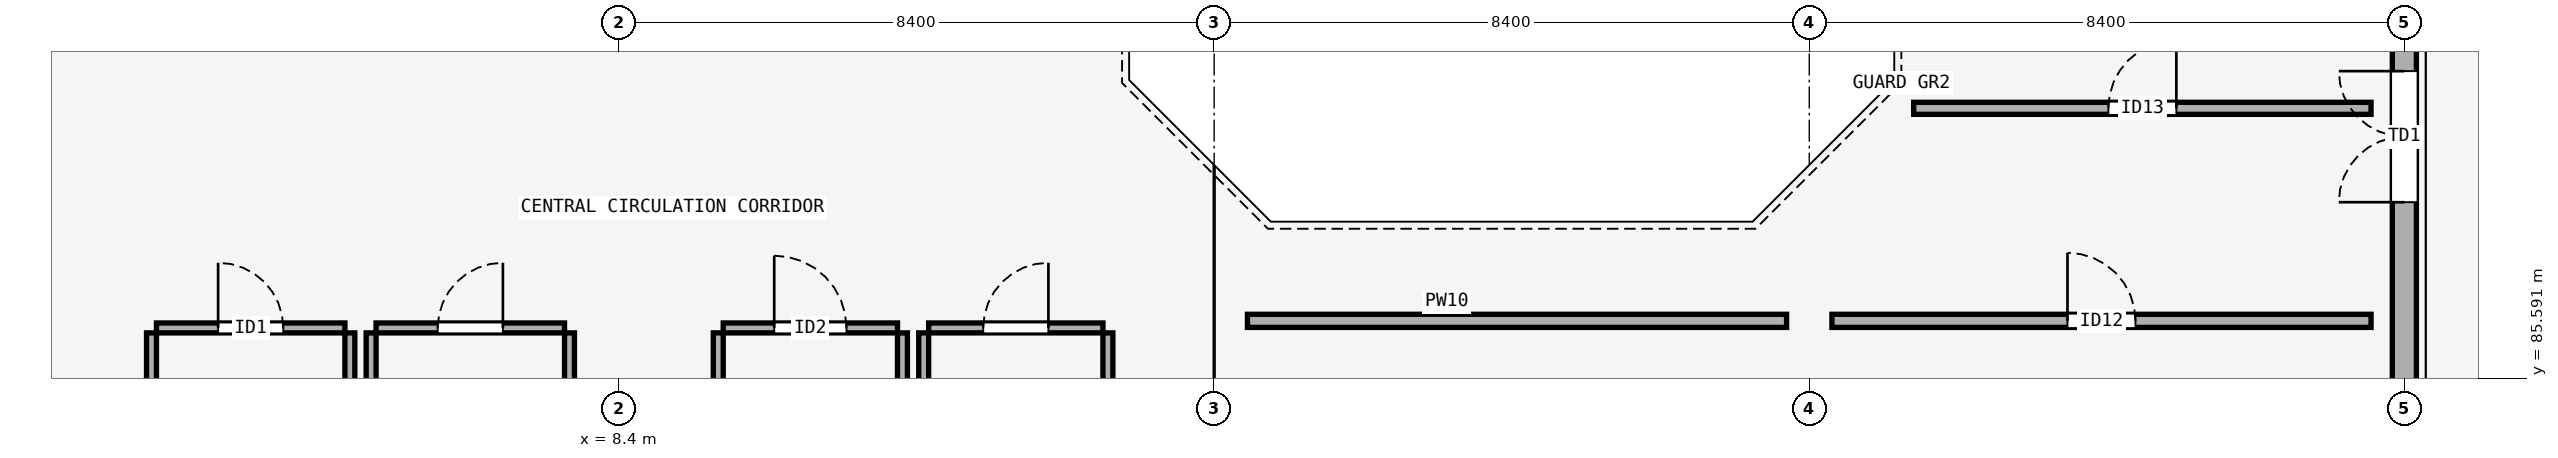
"""IFC4 building model, lengths in metres.
Left out: names, types, materials, properties, quantities, classifications, styles, units other than length and angle.
Written with IfcOpenShell. Run it as: python <this file> out.ifc"""

import sys

from ifc_helpers import new_model, si_unit, direction, frame, frame_2d, origin, place, context, subcontext, project, spatial, rectangle, extrude, element, fill, save


model = new_model("IFC4")
c1 = context("Model", 3, precision=1e-05, world=origin(), true_north=direction((0.0, 1.0)))
c2 = subcontext(c1, "Body", "Model", "MODEL_VIEW")
j1 = project(units=[si_unit("LENGTHUNIT", "METRE"), si_unit("PLANEANGLEUNIT", "RADIAN")], contexts=[c1])
p1 = place(None, origin())
s1 = spatial("IfcSite", under=j1, at=p1, CompositionType="ELEMENT")
p2 = place(p1, origin())
s2 = spatial("IfcBuilding", under=s1, at=p2, CompositionType="ELEMENT")
p3 = place(p2, frame((0.0, 0.0, 27.9)))
s3 = spatial("IfcBuildingStorey", under=s2, at=p3, CompositionType="ELEMENT", Elevation=27.9)
p4 = place(p3, frame((33.6, 85.125, 0.0), z_axis=(0.0, 0.0, 1.0), x_axis=(0.0, 1.0, 0.0)))
e1 = element("IfcWall", 1, at=p4, inside=s3, PredefinedType="SOLIDWALL", context=c2, shape_type="SweptSolid", body=[
    extrude(rectangle(XDim=7.75, YDim=0.34, at=frame_2d((3.875, 0.0))), origin(), (0.0, 0.0, 1.0), 3.45),
])
p5 = place(p4, frame((2.95, 0.0, 0.0)))
e2 = element("IfcOpeningElement", 2, at=p5, cuts=e1, PredefinedType="OPENING", context=c2, shape_type="SweptSolid", body=[
    extrude(rectangle(XDim=1.85, YDim=2.3, at=frame_2d((0.925, 1.15))), frame((0.0, 0.18, 0.0), z_axis=(0.0, -1.0, 0.0), x_axis=(1.0, 0.0, 0.0)), (0.0, 0.0, 1.0), 0.36),
])
p6 = place(p3, frame((1.87, 86.3, 0.0), z_axis=(0.0, 0.0, 1.0), x_axis=(1.0, 0.0, 0.0)))
e3 = element("IfcWall", 3, at=p6, inside=s3, PredefinedType="PARTITIONING", context=c2, shape_type="SweptSolid", body=[
    extrude(rectangle(XDim=2.66, YDim=0.14, at=frame_2d((1.33, 0.0))), origin(), (0.0, 0.0, 1.0), 4.2),
])
p7 = place(p6, frame((0.87, 0.0, 0.0)))
e4 = element("IfcOpeningElement", 4, at=p7, cuts=e3, PredefinedType="OPENING", context=c2, shape_type="SweptSolid", body=[
    extrude(rectangle(XDim=0.92, YDim=2.12, at=frame_2d((0.46, 1.06))), frame((0.0, 0.08, 0.0), z_axis=(0.0, -1.0, 0.0), x_axis=(1.0, 0.0, 0.0)), (0.0, 0.0, 1.0), 0.16),
])
for number, where, z_axis, x_axis in (
    (5, (1.8, 83.87, 0.0), (0.0, 0.0, 1.0), (0.0, 1.0, 0.0)),
    (6, (4.6, 83.87, 0.0), (0.0, 0.0, 1.0), (0.0, 1.0, 0.0)),
):
    element("IfcWall", number, at=place(p3, frame(where, z_axis=z_axis, x_axis=x_axis)), inside=s3, PredefinedType="PARTITIONING", context=c2, shape_type="SweptSolid", body=[
        extrude(rectangle(XDim=2.36, YDim=0.14, at=frame_2d((1.18, 0.0))), origin(), (0.0, 0.0, 1.0), 3.45),
    ])
p8 = place(p3, frame((4.97, 86.3, 0.0), z_axis=(0.0, 0.0, 1.0), x_axis=(1.0, 0.0, 0.0)))
e7 = element("IfcWall", 7, at=p8, inside=s3, PredefinedType="PARTITIONING", context=c2, shape_type="SweptSolid", body=[
    extrude(rectangle(XDim=2.66, YDim=0.14, at=frame_2d((1.33, 0.0))), origin(), (0.0, 0.0, 1.0), 4.2),
])
p9 = place(p8, frame((0.87, 0.0, 0.0)))
e8 = element("IfcOpeningElement", 8, at=p9, cuts=e7, PredefinedType="OPENING", context=c2, shape_type="SweptSolid", body=[
    extrude(rectangle(XDim=0.92, YDim=2.12, at=frame_2d((0.46, 1.06))), frame((0.0, 0.08, 0.0), z_axis=(0.0, -1.0, 0.0), x_axis=(1.0, 0.0, 0.0)), (0.0, 0.0, 1.0), 0.16),
])
for number, where, z_axis, x_axis in (
    (9, (4.9, 83.87, 0.0), (0.0, 0.0, 1.0), (0.0, 1.0, 0.0)),
    (10, (7.7, 83.87, 0.0), (0.0, 0.0, 1.0), (0.0, 1.0, 0.0)),
):
    element("IfcWall", number, at=place(p3, frame(where, z_axis=z_axis, x_axis=x_axis)), inside=s3, PredefinedType="PARTITIONING", context=c2, shape_type="SweptSolid", body=[
        extrude(rectangle(XDim=2.36, YDim=0.14, at=frame_2d((1.18, 0.0))), origin(), (0.0, 0.0, 1.0), 3.45),
    ])
p10 = place(p3, frame((9.87, 86.3, 0.0), z_axis=(0.0, 0.0, 1.0), x_axis=(1.0, 0.0, 0.0)))
e11 = element("IfcWall", 11, at=p10, inside=s3, PredefinedType="PARTITIONING", context=c2, shape_type="SweptSolid", body=[
    extrude(rectangle(XDim=2.46, YDim=0.14, at=frame_2d((1.23, 0.0))), origin(), (0.0, 0.0, 1.0), 4.2),
])
p11 = place(p10, frame((0.72, 0.0, 0.0)))
e12 = element("IfcOpeningElement", 12, at=p11, cuts=e11, PredefinedType="OPENING", context=c2, shape_type="SweptSolid", body=[
    extrude(rectangle(XDim=1.02, YDim=2.15, at=frame_2d((0.51, 1.075))), frame((0.0, 0.08, 0.0), z_axis=(0.0, -1.0, 0.0), x_axis=(1.0, 0.0, 0.0)), (0.0, 0.0, 1.0), 0.16),
])
for number, where, z_axis, x_axis in (
    (13, (9.8, 83.87, 0.0), (0.0, 0.0, 1.0), (0.0, 1.0, 0.0)),
    (14, (12.4, 83.87, 0.0), (0.0, 0.0, 1.0), (0.0, 1.0, 0.0)),
):
    element("IfcWall", number, at=place(p3, frame(where, z_axis=z_axis, x_axis=x_axis)), inside=s3, PredefinedType="PARTITIONING", context=c2, shape_type="SweptSolid", body=[
        extrude(rectangle(XDim=2.36, YDim=0.14, at=frame_2d((1.18, 0.0))), origin(), (0.0, 0.0, 1.0), 3.45),
    ])
p12 = place(p3, frame((12.77, 86.3, 0.0), z_axis=(0.0, 0.0, 1.0), x_axis=(1.0, 0.0, 0.0)))
e15 = element("IfcWall", 15, at=p12, inside=s3, PredefinedType="PARTITIONING", context=c2, shape_type="SweptSolid", body=[
    extrude(rectangle(XDim=2.46, YDim=0.14, at=frame_2d((1.23, 0.0))), origin(), (0.0, 0.0, 1.0), 4.2),
])
p13 = place(p12, frame((0.77, 0.0, 0.0)))
e16 = element("IfcOpeningElement", 16, at=p13, cuts=e15, PredefinedType="OPENING", context=c2, shape_type="SweptSolid", body=[
    extrude(rectangle(XDim=0.92, YDim=2.12, at=frame_2d((0.46, 1.06))), frame((0.0, 0.08, 0.0), z_axis=(0.0, -1.0, 0.0), x_axis=(1.0, 0.0, 0.0)), (0.0, 0.0, 1.0), 0.16),
])
for number, where, z_axis, x_axis in (
    (17, (12.7, 83.87, 0.0), (0.0, 0.0, 1.0), (0.0, 1.0, 0.0)),
    (18, (15.3, 83.87, 0.0), (0.0, 0.0, 1.0), (0.0, 1.0, 0.0)),
):
    element("IfcWall", number, at=place(p3, frame(where, z_axis=z_axis, x_axis=x_axis)), inside=s3, PredefinedType="PARTITIONING", context=c2, shape_type="SweptSolid", body=[
        extrude(rectangle(XDim=2.36, YDim=0.14, at=frame_2d((1.18, 0.0))), origin(), (0.0, 0.0, 1.0), 3.45),
    ])
p14 = place(p3, frame((17.27, 86.4, 0.0), z_axis=(0.0, 0.0, 1.0), x_axis=(1.0, 0.0, 0.0)))
e19 = element("IfcWall", 19, at=p14, inside=s3, PredefinedType="PARTITIONING", context=c2, shape_type="SweptSolid", body=[
    extrude(rectangle(XDim=7.61, YDim=0.185, at=frame_2d((3.805, 0.0))), origin(), (0.0, 0.0, 1.0), 4.2),
])
p15 = place(p3, frame((25.52, 86.4, 0.0), z_axis=(0.0, 0.0, 1.0), x_axis=(1.0, 0.0, 0.0)))
e20 = element("IfcWall", 20, at=p15, inside=s3, PredefinedType="PARTITIONING", context=c2, shape_type="SweptSolid", body=[
    extrude(rectangle(XDim=7.61, YDim=0.185, at=frame_2d((3.805, 0.0))), origin(), (0.0, 0.0, 1.0), 4.2),
])
p16 = place(p15, frame((3.325, 0.0, 0.0)))
e21 = element("IfcOpeningElement", 21, at=p16, cuts=e20, PredefinedType="OPENING", context=c2, shape_type="SweptSolid", body=[
    extrude(rectangle(XDim=0.96, YDim=2.22, at=frame_2d((0.48, 1.11))), frame((0.0, 0.103, 0.0), z_axis=(0.0, -1.0, 0.0), x_axis=(1.0, 0.0, 0.0)), (0.0, 0.0, 1.0), 0.205),
])
p17 = place(p3, frame((26.674, 89.4, 0.0), z_axis=(0.0, 0.0, 1.0), x_axis=(1.0, 0.0, 0.0)))
e22 = element("IfcWall", 22, at=p17, inside=s3, PredefinedType="PARTITIONING", context=c2, shape_type="SweptSolid", body=[
    extrude(rectangle(XDim=6.456, YDim=0.17, at=frame_2d((3.228, 0.0))), origin(), (0.0, 0.0, 1.0), 4.2),
])
p18 = place(p17, frame((2.748, 0.0, 0.0)))
e23 = element("IfcOpeningElement", 23, at=p18, cuts=e22, PredefinedType="OPENING", context=c2, shape_type="SweptSolid", body=[
    extrude(rectangle(XDim=0.96, YDim=2.34, at=frame_2d((0.48, 1.17))), frame((0.0, 0.095, 0.0), z_axis=(0.0, -1.0, 0.0), x_axis=(1.0, 0.0, 0.0)), (0.0, 0.0, 1.0), 0.19),
])
p19 = place(p5, origin())
e24 = element("IfcDoor", 24, at=p19, inside=s3, OperationType="DOUBLE_DOOR_SINGLE_SWING", PredefinedType="DOOR", context=c2, shape_type="SweptSolid", body=[
    extrude(rectangle(XDim=1.85, YDim=2.3, at=frame_2d((0.925, 1.15))), frame((0.0, 0.025, 0.0), z_axis=(0.0, -1.0, 0.0), x_axis=(1.0, 0.0, 0.0)), (0.0, 0.0, 1.0), 0.05),
])
fill(e2, e24)
p20 = place(p7, origin())
e25 = element("IfcDoor", 25, at=p20, inside=s3, OperationType="SINGLE_SWING_LEFT", PredefinedType="DOOR", context=c2, shape_type="SweptSolid", body=[
    extrude(rectangle(XDim=0.92, YDim=2.12, at=frame_2d((0.46, 1.06))), frame((0.0, 0.025, 0.0), z_axis=(0.0, -1.0, 0.0), x_axis=(1.0, 0.0, 0.0)), (0.0, 0.0, 1.0), 0.05),
])
fill(e4, e25)
p21 = place(p9, origin())
e26 = element("IfcDoor", 26, at=p21, inside=s3, OperationType="SINGLE_SWING_RIGHT", PredefinedType="DOOR", context=c2, shape_type="SweptSolid", body=[
    extrude(rectangle(XDim=0.92, YDim=2.12, at=frame_2d((0.46, 1.06))), frame((0.0, 0.025, 0.0), z_axis=(0.0, -1.0, 0.0), x_axis=(1.0, 0.0, 0.0)), (0.0, 0.0, 1.0), 0.05),
])
fill(e8, e26)
p22 = place(p11, origin())
e27 = element("IfcDoor", 27, at=p22, inside=s3, OperationType="SINGLE_SWING_LEFT", PredefinedType="DOOR", context=c2, shape_type="SweptSolid", body=[
    extrude(rectangle(XDim=1.02, YDim=2.15, at=frame_2d((0.51, 1.075))), frame((0.0, 0.025, 0.0), z_axis=(0.0, -1.0, 0.0), x_axis=(1.0, 0.0, 0.0)), (0.0, 0.0, 1.0), 0.05),
])
fill(e12, e27)
p23 = place(p13, origin())
e28 = element("IfcDoor", 28, at=p23, inside=s3, OperationType="SINGLE_SWING_RIGHT", PredefinedType="DOOR", context=c2, shape_type="SweptSolid", body=[
    extrude(rectangle(XDim=0.92, YDim=2.12, at=frame_2d((0.46, 1.06))), frame((0.0, 0.025, 0.0), z_axis=(0.0, -1.0, 0.0), x_axis=(1.0, 0.0, 0.0)), (0.0, 0.0, 1.0), 0.05),
])
fill(e16, e28)
p24 = place(p16, origin())
e29 = element("IfcDoor", 29, at=p24, inside=s3, OperationType="SINGLE_SWING_LEFT", PredefinedType="DOOR", context=c2, shape_type="SweptSolid", body=[
    extrude(rectangle(XDim=0.96, YDim=2.22, at=frame_2d((0.48, 1.11))), frame((0.0, 0.025, 0.0), z_axis=(0.0, -1.0, 0.0), x_axis=(1.0, 0.0, 0.0)), (0.0, 0.0, 1.0), 0.05),
])
fill(e21, e29)
p25 = place(p18, origin())
e30 = element("IfcDoor", 30, at=p25, inside=s3, OperationType="SINGLE_SWING_RIGHT", PredefinedType="DOOR", context=c2, shape_type="SweptSolid", body=[
    extrude(rectangle(XDim=0.96, YDim=2.34, at=frame_2d((0.48, 1.17))), frame((0.0, 0.025, 0.0), z_axis=(0.0, -1.0, 0.0), x_axis=(1.0, 0.0, 0.0)), (0.0, 0.0, 1.0), 0.05),
])
fill(e23, e30)
save(model, sys.argv[1])
